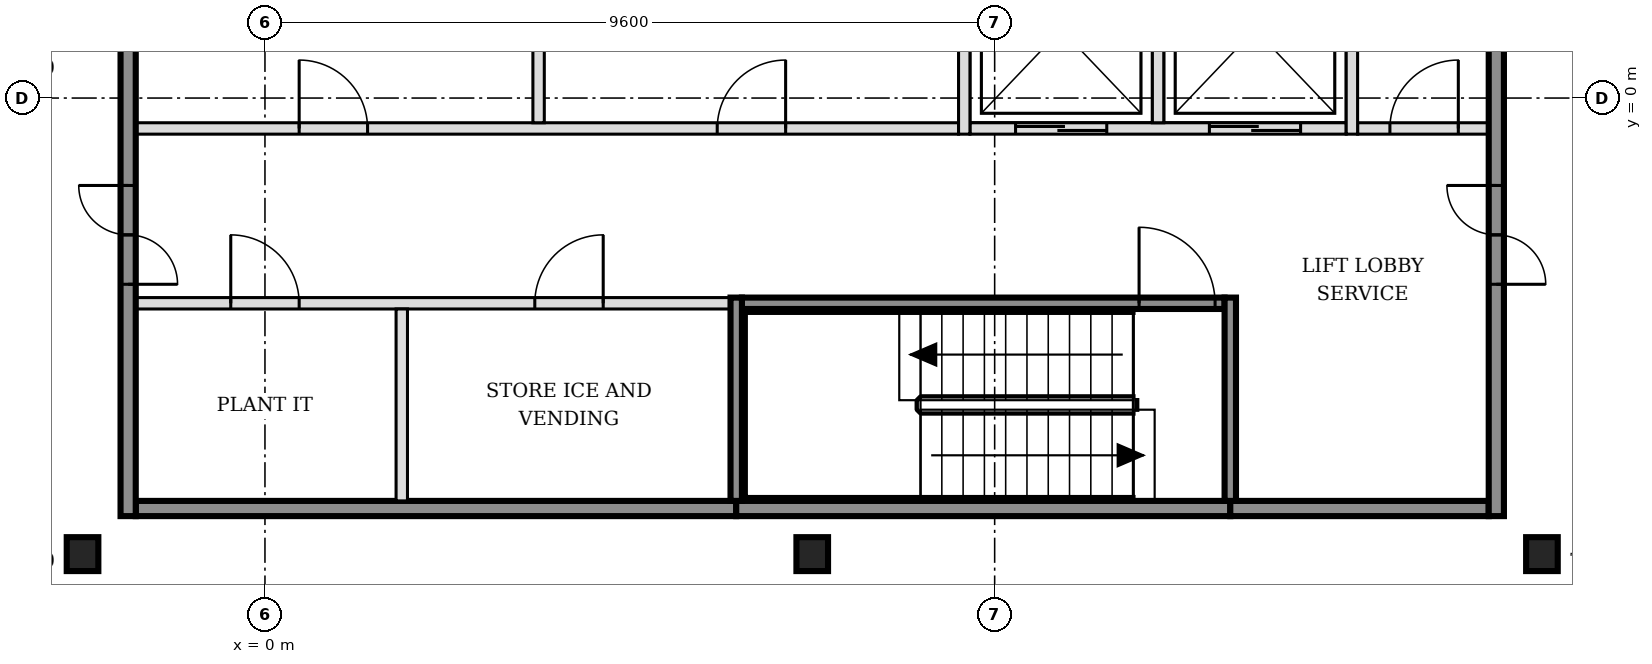
"""IFC4 building model, lengths in metres.
Left out: names, types, materials, properties, quantities, classifications, styles, units other than length and angle.
Written with IfcOpenShell. Run it as: python <this file> out.ifc"""

import sys

from ifc_helpers import new_model, si_unit, direction, frame, frame_2d, origin, origin_2d, place, context, subcontext, project, spatial, rectangle, i_section, extrude, element, fill, save


model = new_model("IFC4")
c1 = context("Model", 3, precision=1e-05, world=origin(), true_north=direction((0.0, 1.0)))
c2 = subcontext(c1, "Body", "Model", "MODEL_VIEW")
j1 = project(units=[si_unit("LENGTHUNIT", "METRE"), si_unit("PLANEANGLEUNIT", "RADIAN")], contexts=[c1])
p1 = place(None, origin())
s1 = spatial("IfcSite", under=j1, at=p1, CompositionType="ELEMENT")
p2 = place(p1, origin())
s2 = spatial("IfcBuilding", under=s1, at=p2, CompositionType="ELEMENT")
p3 = place(p2, frame((0.0, 0.0, 179.4)))
s3 = spatial("IfcBuildingStorey", under=s2, at=p3, CompositionType="ELEMENT", Elevation=179.4)
for number, where, z_axis, x_axis in (
    (1, (-2.4, -6.0, -0.15), (0.0, 0.0, 1.0), (1.0, 0.0, 0.0)),
    (2, (7.2, -6.0, -0.15), (0.0, 0.0, 1.0), (1.0, 0.0, 0.0)),
    (3, (16.8, -6.0, -0.15), (0.0, 0.0, 1.0), (1.0, 0.0, 0.0)),
):
    element("IfcColumn", number, at=place(p3, frame(where, z_axis=z_axis, x_axis=x_axis)), inside=s3, PredefinedType="COLUMN", context=c2, shape_type="SweptSolid", body=[
        extrude(i_section(OverallWidth=0.416, OverallDepth=0.446, WebThickness=0.039, FlangeThickness=0.063, FilletRadius=0.015, at=origin_2d()), origin(), (0.0, 0.0, 1.0), 3.6),
    ])
p4 = place(p3, frame((-1.7, -5.4, 0.0), z_axis=(0.0, 0.0, 1.0), x_axis=(1.0, 0.0, 0.0)))
e4 = element("IfcWall", 4, at=p4, inside=s3, PredefinedType="SOLIDWALL", context=c2, shape_type="SweptSolid", body=[
    extrude(rectangle(XDim=7.9, YDim=0.2, at=frame_2d((3.95, 0.0))), origin(), (0.0, 0.0, 1.0), 3.45),
])
p5 = place(p3, frame((6.2, -5.4, 0.0), z_axis=(0.0, 0.0, 1.0), x_axis=(1.0, 0.0, 0.0)))
e5 = element("IfcWall", 5, at=p5, inside=s3, PredefinedType="SOLIDWALL", context=c2, shape_type="SweptSolid", body=[
    extrude(rectangle(XDim=6.5, YDim=0.2, at=frame_2d((3.25, 0.0))), origin(), (0.0, 0.0, 1.0), 3.45),
])
p6 = place(p3, frame((12.7, -5.4, 0.0), z_axis=(0.0, 0.0, 1.0), x_axis=(1.0, 0.0, 0.0)))
e6 = element("IfcWall", 6, at=p6, inside=s3, PredefinedType="SOLIDWALL", context=c2, shape_type="SweptSolid", body=[
    extrude(rectangle(XDim=3.4, YDim=0.2, at=frame_2d((1.7, 0.0))), origin(), (0.0, 0.0, 1.0), 3.45),
])
p7 = place(p3, frame((-1.7, -2.7, 0.0), z_axis=(0.0, 0.0, 1.0), x_axis=(1.0, 0.0, 0.0)))
e7 = element("IfcWall", 7, at=p7, inside=s3, PredefinedType="PARTITIONING", context=c2, shape_type="SweptSolid", body=[
    extrude(rectangle(XDim=7.825, YDim=0.15, at=frame_2d((3.913, 0.0))), origin(), (0.0, 0.0, 1.0), 3.45),
])
p8 = place(p7, frame((1.25, 0.0, 0.0)))
e8 = element("IfcOpeningElement", 8, at=p8, cuts=e7, PredefinedType="OPENING", context=c2, shape_type="SweptSolid", body=[
    extrude(rectangle(XDim=0.9, YDim=2.1, at=frame_2d((0.45, 1.05))), frame((0.0, 0.085, 0.0), z_axis=(0.0, -1.0, 0.0), x_axis=(1.0, 0.0, 0.0)), (0.0, 0.0, 1.0), 0.17),
])
p9 = place(p7, frame((5.25, 0.0, 0.0)))
e9 = element("IfcOpeningElement", 9, at=p9, cuts=e7, PredefinedType="OPENING", context=c2, shape_type="SweptSolid", body=[
    extrude(rectangle(XDim=0.9, YDim=2.1, at=frame_2d((0.45, 1.05))), frame((0.0, 0.085, 0.0), z_axis=(0.0, -1.0, 0.0), x_axis=(1.0, 0.0, 0.0)), (0.0, 0.0, 1.0), 0.17),
])
p10 = place(p3, frame((6.275, -2.7, 0.0), z_axis=(0.0, 0.0, 1.0), x_axis=(1.0, 0.0, 0.0)))
e10 = element("IfcWall", 10, at=p10, inside=s3, PredefinedType="SOLIDWALL", context=c2, shape_type="SweptSolid", body=[
    extrude(rectangle(XDim=6.35, YDim=0.15, at=frame_2d((3.175, 0.0))), origin(), (0.0, 0.0, 1.0), 3.45),
])
p11 = place(p10, frame((5.225, 0.0, 0.0)))
e11 = element("IfcOpeningElement", 11, at=p11, cuts=e10, PredefinedType="OPENING", context=c2, shape_type="SweptSolid", body=[
    extrude(rectangle(XDim=1.0, YDim=2.1, at=frame_2d((0.5, 1.05))), frame((0.0, 0.085, 0.0), z_axis=(0.0, -1.0, 0.0), x_axis=(1.0, 0.0, 0.0)), (0.0, 0.0, 1.0), 0.17),
])
p12 = place(p3, frame((-1.7, -0.4, 0.0), z_axis=(0.0, 0.0, 1.0), x_axis=(1.0, 0.0, 0.0)))
e12 = element("IfcWall", 12, at=p12, inside=s3, PredefinedType="PARTITIONING", context=c2, shape_type="SweptSolid", body=[
    extrude(rectangle(XDim=10.825, YDim=0.15, at=frame_2d((5.413, 0.0))), origin(), (0.0, 0.0, 1.0), 3.45),
])
p13 = place(p12, frame((2.15, 0.0, 0.0)))
e13 = element("IfcOpeningElement", 13, at=p13, cuts=e12, PredefinedType="OPENING", context=c2, shape_type="SweptSolid", body=[
    extrude(rectangle(XDim=0.9, YDim=2.1, at=frame_2d((0.45, 1.05))), frame((0.0, 0.085, 0.0), z_axis=(0.0, -1.0, 0.0), x_axis=(1.0, 0.0, 0.0)), (0.0, 0.0, 1.0), 0.17),
])
p14 = place(p12, frame((7.65, 0.0, 0.0)))
e14 = element("IfcOpeningElement", 14, at=p14, cuts=e12, PredefinedType="OPENING", context=c2, shape_type="SweptSolid", body=[
    extrude(rectangle(XDim=0.9, YDim=2.1, at=frame_2d((0.45, 1.05))), frame((0.0, 0.085, 0.0), z_axis=(0.0, -1.0, 0.0), x_axis=(1.0, 0.0, 0.0)), (0.0, 0.0, 1.0), 0.17),
])
p15 = place(p3, frame((9.275, -0.4, 0.0), z_axis=(0.0, 0.0, 1.0), x_axis=(1.0, 0.0, 0.0)))
e15 = element("IfcWall", 15, at=p15, inside=s3, PredefinedType="SOLIDWALL", context=c2, shape_type="SweptSolid", body=[
    extrude(rectangle(XDim=4.95, YDim=0.15, at=frame_2d((2.475, 0.0))), origin(), (0.0, 0.0, 1.0), 3.45),
])
p16 = place(p15, frame((0.6, 0.0, 0.0)))
e16 = element("IfcOpeningElement", 16, at=p16, cuts=e15, PredefinedType="OPENING", context=c2, shape_type="SweptSolid", body=[
    extrude(rectangle(XDim=1.2, YDim=2.1, at=frame_2d((0.6, 1.05))), frame((0.0, 0.085, 0.0), z_axis=(0.0, -1.0, 0.0), x_axis=(1.0, 0.0, 0.0)), (0.0, 0.0, 1.0), 0.17),
])
p17 = place(p15, frame((3.15, 0.0, 0.0)))
e17 = element("IfcOpeningElement", 17, at=p17, cuts=e15, PredefinedType="OPENING", context=c2, shape_type="SweptSolid", body=[
    extrude(rectangle(XDim=1.2, YDim=2.1, at=frame_2d((0.6, 1.05))), frame((0.0, 0.085, 0.0), z_axis=(0.0, -1.0, 0.0), x_axis=(1.0, 0.0, 0.0)), (0.0, 0.0, 1.0), 0.17),
])
p18 = place(p3, frame((14.375, -0.4, 0.0), z_axis=(0.0, 0.0, 1.0), x_axis=(1.0, 0.0, 0.0)))
e18 = element("IfcWall", 18, at=p18, inside=s3, PredefinedType="PARTITIONING", context=c2, shape_type="SweptSolid", body=[
    extrude(rectangle(XDim=1.725, YDim=0.15, at=frame_2d((0.863, 0.0))), origin(), (0.0, 0.0, 1.0), 3.45),
])
p19 = place(p18, frame((0.425, 0.0, 0.0)))
e19 = element("IfcOpeningElement", 19, at=p19, cuts=e18, PredefinedType="OPENING", context=c2, shape_type="SweptSolid", body=[
    extrude(rectangle(XDim=0.9, YDim=2.1, at=frame_2d((0.45, 1.05))), frame((0.0, 0.085, 0.0), z_axis=(0.0, -1.0, 0.0), x_axis=(1.0, 0.0, 0.0)), (0.0, 0.0, 1.0), 0.17),
])
p20 = place(p3, frame((-1.8, -5.5, 0.0), z_axis=(0.0, 0.0, 1.0), x_axis=(0.0, 1.0, 0.0)))
e20 = element("IfcWall", 20, at=p20, inside=s3, PredefinedType="SOLIDWALL", context=c2, shape_type="SweptSolid", body=[
    extrude(rectangle(XDim=15.8, YDim=0.2, at=frame_2d((7.9, 0.0))), origin(), (0.0, 0.0, 1.0), 3.45),
])
p21 = place(p20, frame((3.05, 0.0, 0.0)))
e21 = element("IfcOpeningElement", 21, at=p21, cuts=e20, PredefinedType="OPENING", context=c2, shape_type="SweptSolid", body=[
    extrude(rectangle(XDim=1.3, YDim=2.1, at=frame_2d((0.65, 1.05))), frame((0.0, 0.11, 0.0), z_axis=(0.0, -1.0, 0.0), x_axis=(1.0, 0.0, 0.0)), (0.0, 0.0, 1.0), 0.22),
])
p22 = place(p20, frame((11.45, 0.0, 0.0)))
e22 = element("IfcOpeningElement", 22, at=p22, cuts=e20, PredefinedType="OPENING", context=c2, shape_type="SweptSolid", body=[
    extrude(rectangle(XDim=1.3, YDim=2.1, at=frame_2d((0.65, 1.05))), frame((0.0, 0.11, 0.0), z_axis=(0.0, -1.0, 0.0), x_axis=(1.0, 0.0, 0.0)), (0.0, 0.0, 1.0), 0.22),
])
p23 = place(p3, frame((1.8, -5.3, 0.0), z_axis=(0.0, 0.0, 1.0), x_axis=(0.0, 1.0, 0.0)))
e23 = element("IfcWall", 23, at=p23, inside=s3, PredefinedType="PARTITIONING", context=c2, shape_type="SweptSolid", body=[
    extrude(rectangle(XDim=2.525, YDim=0.15, at=frame_2d((1.263, 0.0))), origin(), (0.0, 0.0, 1.0), 3.45),
])
p24 = place(p3, frame((3.6, -0.325, 0.0), z_axis=(0.0, 0.0, 1.0), x_axis=(0.0, 1.0, 0.0)))
e24 = element("IfcWall", 24, at=p24, inside=s3, PredefinedType="PARTITIONING", context=c2, shape_type="SweptSolid", body=[
    extrude(rectangle(XDim=2.45, YDim=0.15, at=frame_2d((1.225, 0.0))), origin(), (0.0, 0.0, 1.0), 3.45),
])
p25 = place(p3, frame((6.2, -5.3, 0.0), z_axis=(0.0, 0.0, 1.0), x_axis=(0.0, 1.0, 0.0)))
e25 = element("IfcWall", 25, at=p25, inside=s3, PredefinedType="SOLIDWALL", context=c2, shape_type="SweptSolid", body=[
    extrude(rectangle(XDim=2.675, YDim=0.15, at=frame_2d((1.337, 0.0))), origin(), (0.0, 0.0, 1.0), 3.45),
])
p26 = place(p3, frame((9.2, -0.475, 0.0), z_axis=(0.0, 0.0, 1.0), x_axis=(0.0, 1.0, 0.0)))
e26 = element("IfcWall", 26, at=p26, inside=s3, PredefinedType="SOLIDWALL", context=c2, shape_type="SweptSolid", body=[
    extrude(rectangle(XDim=2.6, YDim=0.15, at=frame_2d((1.3, 0.0))), origin(), (0.0, 0.0, 1.0), 3.45),
])
p27 = place(p3, frame((11.75, -0.325, 0.0), z_axis=(0.0, 0.0, 1.0), x_axis=(0.0, 1.0, 0.0)))
e27 = element("IfcWall", 27, at=p27, inside=s3, PredefinedType="SOLIDWALL", context=c2, shape_type="SweptSolid", body=[
    extrude(rectangle(XDim=2.45, YDim=0.15, at=frame_2d((1.225, 0.0))), origin(), (0.0, 0.0, 1.0), 3.45),
])
p28 = place(p3, frame((12.7, -5.3, 0.0), z_axis=(0.0, 0.0, 1.0), x_axis=(0.0, 1.0, 0.0)))
e28 = element("IfcWall", 28, at=p28, inside=s3, PredefinedType="SOLIDWALL", context=c2, shape_type="SweptSolid", body=[
    extrude(rectangle(XDim=2.675, YDim=0.15, at=frame_2d((1.337, 0.0))), origin(), (0.0, 0.0, 1.0), 3.45),
])
p29 = place(p3, frame((14.3, -0.475, 0.0), z_axis=(0.0, 0.0, 1.0), x_axis=(0.0, 1.0, 0.0)))
e29 = element("IfcWall", 29, at=p29, inside=s3, PredefinedType="SOLIDWALL", context=c2, shape_type="SweptSolid", body=[
    extrude(rectangle(XDim=2.75, YDim=0.15, at=frame_2d((1.375, 0.0))), origin(), (0.0, 0.0, 1.0), 3.45),
])
p30 = place(p3, frame((16.2, -5.5, 0.0), z_axis=(0.0, 0.0, 1.0), x_axis=(0.0, 1.0, 0.0)))
e30 = element("IfcWall", 30, at=p30, inside=s3, PredefinedType="SOLIDWALL", context=c2, shape_type="SweptSolid", body=[
    extrude(rectangle(XDim=15.8, YDim=0.2, at=frame_2d((7.9, 0.0))), origin(), (0.0, 0.0, 1.0), 3.45),
])
p31 = place(p30, frame((3.05, 0.0, 0.0)))
e31 = element("IfcOpeningElement", 31, at=p31, cuts=e30, PredefinedType="OPENING", context=c2, shape_type="SweptSolid", body=[
    extrude(rectangle(XDim=1.3, YDim=2.1, at=frame_2d((0.65, 1.05))), frame((0.0, 0.11, 0.0), z_axis=(0.0, -1.0, 0.0), x_axis=(1.0, 0.0, 0.0)), (0.0, 0.0, 1.0), 0.22),
])
p32 = place(p30, frame((11.45, 0.0, 0.0)))
e32 = element("IfcOpeningElement", 32, at=p32, cuts=e30, PredefinedType="OPENING", context=c2, shape_type="SweptSolid", body=[
    extrude(rectangle(XDim=1.3, YDim=2.1, at=frame_2d((0.65, 1.05))), frame((0.0, 0.11, 0.0), z_axis=(0.0, -1.0, 0.0), x_axis=(1.0, 0.0, 0.0)), (0.0, 0.0, 1.0), 0.22),
])
p33 = place(p16, origin())
e33 = element("IfcDoor", 33, at=p33, inside=s3, OperationType="DOUBLE_DOOR_SLIDING", PredefinedType="DOOR", context=c2, shape_type="SweptSolid", body=[
    extrude(rectangle(XDim=1.2, YDim=2.1, at=frame_2d((0.6, 1.05))), frame((0.0, 0.025, 0.0), z_axis=(0.0, -1.0, 0.0), x_axis=(1.0, 0.0, 0.0)), (0.0, 0.0, 1.0), 0.05),
])
fill(e16, e33)
p34 = place(p17, origin())
e34 = element("IfcDoor", 34, at=p34, inside=s3, OperationType="DOUBLE_DOOR_SLIDING", PredefinedType="DOOR", context=c2, shape_type="SweptSolid", body=[
    extrude(rectangle(XDim=1.2, YDim=2.1, at=frame_2d((0.6, 1.05))), frame((0.0, 0.025, 0.0), z_axis=(0.0, -1.0, 0.0), x_axis=(1.0, 0.0, 0.0)), (0.0, 0.0, 1.0), 0.05),
])
fill(e17, e34)
p35 = place(p11, origin())
e35 = element("IfcDoor", 35, at=p35, inside=s3, OperationType="SINGLE_SWING_LEFT", PredefinedType="DOOR", context=c2, shape_type="SweptSolid", body=[
    extrude(rectangle(XDim=1.0, YDim=2.1, at=frame_2d((0.5, 1.05))), frame((0.0, 0.025, 0.0), z_axis=(0.0, -1.0, 0.0), x_axis=(1.0, 0.0, 0.0)), (0.0, 0.0, 1.0), 0.05),
])
fill(e11, e35)
p36 = place(p21, origin())
e36 = element("IfcDoor", 36, at=p36, inside=s3, OperationType="DOUBLE_DOOR_SINGLE_SWING", PredefinedType="DOOR", context=c2, shape_type="SweptSolid", body=[
    extrude(rectangle(XDim=1.3, YDim=2.1, at=frame_2d((0.65, 1.05))), frame((0.0, 0.025, 0.0), z_axis=(0.0, -1.0, 0.0), x_axis=(1.0, 0.0, 0.0)), (0.0, 0.0, 1.0), 0.05),
])
fill(e21, e36)
p37 = place(p31, origin())
e37 = element("IfcDoor", 37, at=p37, inside=s3, OperationType="DOUBLE_DOOR_SINGLE_SWING", PredefinedType="DOOR", context=c2, shape_type="SweptSolid", body=[
    extrude(rectangle(XDim=1.3, YDim=2.1, at=frame_2d((0.65, 1.05))), frame((0.0, 0.025, 0.0), z_axis=(0.0, -1.0, 0.0), x_axis=(1.0, 0.0, 0.0)), (0.0, 0.0, 1.0), 0.05),
])
fill(e31, e37)
p38 = place(p19, origin())
e38 = element("IfcDoor", 38, at=p38, inside=s3, OperationType="SINGLE_SWING_RIGHT", PredefinedType="DOOR", context=c2, shape_type="SweptSolid", body=[
    extrude(rectangle(XDim=0.9, YDim=2.1, at=frame_2d((0.45, 1.05))), frame((0.0, 0.025, 0.0), z_axis=(0.0, -1.0, 0.0), x_axis=(1.0, 0.0, 0.0)), (0.0, 0.0, 1.0), 0.05),
])
fill(e19, e38)
p39 = place(p8, origin())
e39 = element("IfcDoor", 39, at=p39, inside=s3, OperationType="SINGLE_SWING_LEFT", PredefinedType="DOOR", context=c2, shape_type="SweptSolid", body=[
    extrude(rectangle(XDim=0.9, YDim=2.1, at=frame_2d((0.45, 1.05))), frame((0.0, 0.025, 0.0), z_axis=(0.0, -1.0, 0.0), x_axis=(1.0, 0.0, 0.0)), (0.0, 0.0, 1.0), 0.05),
])
fill(e8, e39)
p40 = place(p9, origin())
e40 = element("IfcDoor", 40, at=p40, inside=s3, OperationType="SINGLE_SWING_RIGHT", PredefinedType="DOOR", context=c2, shape_type="SweptSolid", body=[
    extrude(rectangle(XDim=0.9, YDim=2.1, at=frame_2d((0.45, 1.05))), frame((0.0, 0.025, 0.0), z_axis=(0.0, -1.0, 0.0), x_axis=(1.0, 0.0, 0.0)), (0.0, 0.0, 1.0), 0.05),
])
fill(e9, e40)
p41 = place(p13, origin())
e41 = element("IfcDoor", 41, at=p41, inside=s3, OperationType="SINGLE_SWING_LEFT", PredefinedType="DOOR", context=c2, shape_type="SweptSolid", body=[
    extrude(rectangle(XDim=0.9, YDim=2.1, at=frame_2d((0.45, 1.05))), frame((0.0, 0.025, 0.0), z_axis=(0.0, -1.0, 0.0), x_axis=(1.0, 0.0, 0.0)), (0.0, 0.0, 1.0), 0.05),
])
fill(e13, e41)
p42 = place(p14, origin())
e42 = element("IfcDoor", 42, at=p42, inside=s3, OperationType="SINGLE_SWING_RIGHT", PredefinedType="DOOR", context=c2, shape_type="SweptSolid", body=[
    extrude(rectangle(XDim=0.9, YDim=2.1, at=frame_2d((0.45, 1.05))), frame((0.0, 0.025, 0.0), z_axis=(0.0, -1.0, 0.0), x_axis=(1.0, 0.0, 0.0)), (0.0, 0.0, 1.0), 0.05),
])
fill(e14, e42)
save(model, sys.argv[1])
